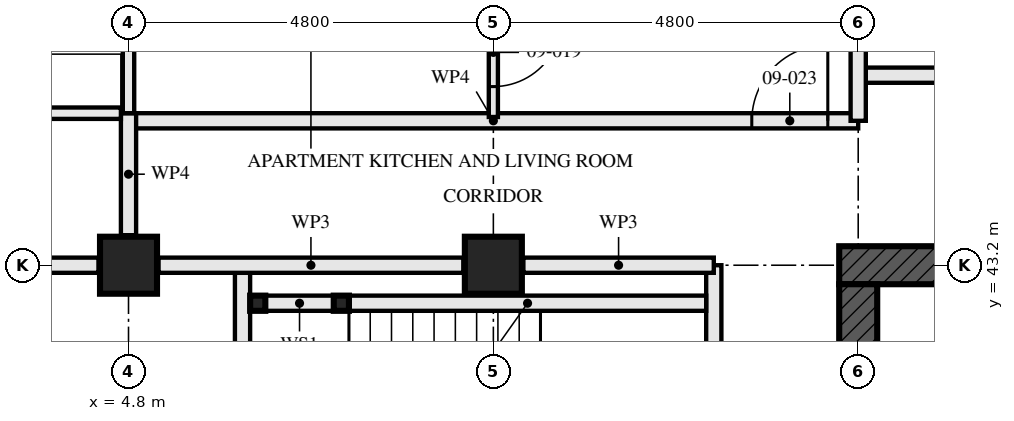
"""IFC4 building model, lengths in metres.
Left out: names, types, materials, properties, quantities, classifications, styles, units other than length and angle.
Written with IfcOpenShell. Run it as: python <this file> out.ifc"""

import sys

from ifc_helpers import new_model, si_unit, direction, frame, frame_2d, origin, origin_2d, place, context, subcontext, project, spatial, rectangle, hollow_rectangle, extrude, element, fill, save


model = new_model("IFC4")
c1 = context("Model", 3, precision=1e-05, world=origin(), true_north=direction((0.0, 1.0)))
c2 = subcontext(c1, "Body", "Model", "MODEL_VIEW")
j1 = project(units=[si_unit("LENGTHUNIT", "METRE"), si_unit("PLANEANGLEUNIT", "RADIAN")], contexts=[c1])
p1 = place(None, origin())
s1 = spatial("IfcSite", under=j1, at=p1, CompositionType="ELEMENT")
p2 = place(p1, origin())
s2 = spatial("IfcBuilding", under=s1, at=p2, CompositionType="ELEMENT")
p3 = place(p2, frame((0.0, 0.0, 37.5)))
s3 = spatial("IfcBuildingStorey", under=s2, at=p3, CompositionType="ELEMENT", Elevation=37.5)
for number, where, z_axis, x_axis in (
    (1, (4.8, 43.2, 0.0), (0.0, 0.0, 1.0), (0.0, 1.0, 0.0)),
    (2, (9.6, 43.2, 0.0), (0.0, 0.0, 1.0), (0.0, 1.0, 0.0)),
):
    element("IfcColumn", number, at=place(p3, frame(where, z_axis=z_axis, x_axis=x_axis)), inside=s3, PredefinedType="COLUMN", context=c2, shape_type="SweptSolid", body=[
        extrude(hollow_rectangle(XDim=0.75, YDim=0.75, WallThickness=0.08, at=origin_2d()), origin(), (0.0, 0.0, 1.0), 3.5),
    ])
p4 = place(p3, frame((29.05, 43.2, -0.17), z_axis=(0.0, 0.0, 1.0), x_axis=(-1.0, 0.0, 0.0)))
e3 = element("IfcWall", 3, at=p4, inside=s3, PredefinedType="SHEAR", context=c2, shape_type="SweptSolid", body=[
    extrude(rectangle(XDim=14.9, YDim=0.5, at=frame_2d((7.45, 0.0))), origin(), (0.0, 0.0, 1.0), 3.5),
])
p5 = place(p4, frame((6.85, 0.0, 0.17)))
e4 = element("IfcOpeningElement", 4, at=p5, cuts=e3, PredefinedType="OPENING", context=c2, shape_type="SweptSolid", body=[
    extrude(rectangle(XDim=1.2, YDim=2.1, at=frame_2d((0.6, 1.05))), frame((0.0, 0.26, 0.0), z_axis=(0.0, -1.0, 0.0), x_axis=(1.0, 0.0, 0.0)), (0.0, 0.0, 1.0), 0.521),
])
p6 = place(p3, frame((14.4, 42.95, -0.17), z_axis=(0.0, 0.0, 1.0), x_axis=(0.0, -1.0, 0.0)))
e5 = element("IfcWall", 5, at=p6, inside=s3, PredefinedType="SHEAR", context=c2, shape_type="SweptSolid", body=[
    extrude(rectangle(XDim=13.9, YDim=0.5, at=frame_2d((6.95, 0.0))), origin(), (0.0, 0.0, 1.0), 3.5),
])
p7 = place(p6, frame((6.35, 0.0, 0.17)))
e6 = element("IfcOpeningElement", 6, at=p7, cuts=e5, PredefinedType="OPENING", context=c2, shape_type="SweptSolid", body=[
    extrude(rectangle(XDim=1.2, YDim=2.1, at=frame_2d((0.6, 1.05))), frame((0.0, 0.26, 0.0), z_axis=(0.0, -1.0, 0.0), x_axis=(1.0, 0.0, 0.0)), (0.0, 0.0, 1.0), 0.521),
])
for number, where, z_axis, x_axis in (
    (7, (6.5, 42.7, 0.0), (0.0, 0.0, 1.0), (1.0, 0.0, 0.0)),
    (8, (7.6, 42.7, 0.0), (0.0, 0.0, 1.0), (1.0, 0.0, 0.0)),
):
    element("IfcColumn", number, at=place(p3, frame(where, z_axis=z_axis, x_axis=x_axis)), inside=s3, PredefinedType="COLUMN", context=c2, shape_type="SweptSolid", body=[
        extrude(hollow_rectangle(XDim=0.2, YDim=0.2, WallThickness=0.008, at=origin_2d()), origin(), (0.0, 0.0, 1.0), 3.33),
    ])
p8 = place(p3, frame((6.6, 42.7, 0.0), z_axis=(0.0, 0.0, 1.0), x_axis=(1.0, 0.0, 0.0)))
e9 = element("IfcWall", 9, at=p8, inside=s3, PredefinedType="SOLIDWALL", context=c2, shape_type="SweptSolid", body=[
    extrude(rectangle(XDim=0.9, YDim=0.2, at=frame_2d((0.45, 0.0))), origin(), (0.0, 0.0, 1.0), 2.99),
])
p9 = place(p3, frame((7.7, 42.7, 0.0), z_axis=(0.0, 0.0, 1.0), x_axis=(1.0, 0.0, 0.0)))
e10 = element("IfcWall", 10, at=p9, inside=s3, PredefinedType="SOLIDWALL", context=c2, shape_type="SweptSolid", body=[
    extrude(rectangle(XDim=4.7, YDim=0.2, at=frame_2d((2.35, 0.0))), origin(), (0.0, 0.0, 1.0), 2.99),
])
p10 = place(p3, frame((6.3, 43.1, 0.0), z_axis=(0.0, 0.0, 1.0), x_axis=(0.0, -1.0, 0.0)))
e11 = element("IfcWall", 11, at=p10, inside=s3, PredefinedType="SOLIDWALL", context=c2, shape_type="SweptSolid", body=[
    extrude(rectangle(XDim=3.3, YDim=0.2, at=frame_2d((1.65, 0.0))), origin(), (0.0, 0.0, 1.0), 3.33),
])
p11 = place(p3, frame((12.5, 43.2, 0.0), z_axis=(0.0, 0.0, 1.0), x_axis=(0.0, -1.0, 0.0)))
e12 = element("IfcWall", 12, at=p11, inside=s3, PredefinedType="PARTITIONING", context=c2, shape_type="SweptSolid", body=[
    extrude(rectangle(XDim=14.4, YDim=0.2, at=frame_2d((7.2, 0.0))), origin(), (0.0, 0.0, 1.0), 2.55),
])
p12 = place(p11, frame((1.4, 0.0, 0.0)))
e13 = element("IfcOpeningElement", 13, at=p12, cuts=e12, PredefinedType="OPENING", context=c2, shape_type="SweptSolid", body=[
    extrude(rectangle(XDim=1.0, YDim=2.1, at=frame_2d((0.5, 1.05))), frame((0.0, 0.111, 0.0), z_axis=(0.0, -1.0, 0.0), x_axis=(1.0, 0.0, 0.0)), (0.0, 0.0, 1.0), 0.221),
])
p13 = place(p11, frame((10.0, 0.0, 0.0)))
e14 = element("IfcOpeningElement", 14, at=p13, cuts=e12, PredefinedType="OPENING", context=c2, shape_type="SweptSolid", body=[
    extrude(rectangle(XDim=1.0, YDim=2.1, at=frame_2d((0.5, 1.05))), frame((0.0, 0.111, 0.0), z_axis=(0.0, -1.0, 0.0), x_axis=(1.0, 0.0, 0.0)), (0.0, 0.0, 1.0), 0.221),
])
p14 = place(p3, frame((4.8, 48.2, 0.0), z_axis=(0.0, 0.0, 1.0), x_axis=(0.0, -1.0, 0.0)))
e15 = element("IfcWall", 15, at=p14, inside=s3, PredefinedType="PARTITIONING", context=c2, shape_type="SweptSolid", body=[
    extrude(rectangle(XDim=3.0, YDim=0.15, at=frame_2d((1.5, 0.0))), origin(), (0.0, 0.0, 1.0), 2.55),
])
p15 = place(p14, frame((1.05, 0.0, 0.0)))
e16 = element("IfcOpeningElement", 16, at=p15, cuts=e15, PredefinedType="OPENING", context=c2, shape_type="SweptSolid", body=[
    extrude(rectangle(XDim=0.9, YDim=2.1, at=frame_2d((0.45, 1.05))), frame((0.0, 0.085, 0.0), z_axis=(0.0, -1.0, 0.0), x_axis=(1.0, 0.0, 0.0)), (0.0, 0.0, 1.0), 0.171),
])
p16 = place(p3, frame((9.6, 49.8, 0.0), z_axis=(0.0, 0.0, 1.0), x_axis=(0.0, -1.0, 0.0)))
e17 = element("IfcWall", 17, at=p16, inside=s3, PredefinedType="PARTITIONING", context=c2, shape_type="SweptSolid", body=[
    extrude(rectangle(XDim=4.65, YDim=0.12, at=frame_2d((2.325, 0.0))), origin(), (0.0, 0.0, 1.0), 2.55),
])
p17 = place(p16, frame((3.35, 0.0, 0.0)))
e18 = element("IfcOpeningElement", 18, at=p17, cuts=e17, PredefinedType="OPENING", context=c2, shape_type="SweptSolid", body=[
    extrude(rectangle(XDim=0.9, YDim=2.1, at=frame_2d((0.45, 1.05))), frame((0.0, 0.071, 0.0), z_axis=(0.0, -1.0, 0.0), x_axis=(1.0, 0.0, 0.0)), (0.0, 0.0, 1.0), 0.141),
])
p18 = place(p3, frame((14.4, 45.1, 0.0), z_axis=(0.0, 0.0, 1.0), x_axis=(-1.0, 0.0, 0.0)))
e19 = element("IfcWall", 19, at=p18, inside=s3, PredefinedType="PARTITIONING", context=c2, shape_type="SweptSolid", body=[
    extrude(rectangle(XDim=9.6, YDim=0.2, at=frame_2d((4.8, 0.0))), origin(), (0.0, 0.0, 1.0), 3.33),
])
p19 = place(p18, frame((0.4, 0.0, 0.0)))
e20 = element("IfcOpeningElement", 20, at=p19, cuts=e19, PredefinedType="OPENING", context=c2, shape_type="SweptSolid", body=[
    extrude(rectangle(XDim=1.0, YDim=2.1, at=frame_2d((0.5, 1.05))), frame((0.0, 0.111, 0.0), z_axis=(0.0, -1.0, 0.0), x_axis=(1.0, 0.0, 0.0)), (0.0, 0.0, 1.0), 0.221),
])
p20 = place(p3, frame((4.8, 45.2, 0.0), z_axis=(0.0, 0.0, 1.0), x_axis=(0.0, -1.0, 0.0)))
e21 = element("IfcWall", 21, at=p20, inside=s3, PredefinedType="PARTITIONING", context=c2, shape_type="SweptSolid", body=[
    extrude(rectangle(XDim=1.605, YDim=0.2, at=frame_2d((0.802, 0.0))), origin(), (0.0, 0.0, 1.0), 3.33),
])
p21 = place(p3, frame((28.8, 45.7, 0.0), z_axis=(0.0, 0.0, 1.0), x_axis=(-1.0, 0.0, 0.0)))
e22 = element("IfcWall", 22, at=p21, inside=s3, PredefinedType="PARTITIONING", context=c2, shape_type="SweptSolid", body=[
    extrude(rectangle(XDim=14.4, YDim=0.2, at=frame_2d((7.2, 0.0))), origin(), (0.0, 0.0, 1.0), 3.33),
])
p22 = place(p21, frame((0.4, 0.0, 0.0)))
e23 = element("IfcOpeningElement", 23, at=p22, cuts=e22, PredefinedType="OPENING", context=c2, shape_type="SweptSolid", body=[
    extrude(rectangle(XDim=1.0, YDim=2.1, at=frame_2d((0.5, 1.05))), frame((0.0, 0.111, 0.0), z_axis=(0.0, -1.0, 0.0), x_axis=(1.0, 0.0, 0.0)), (0.0, 0.0, 1.0), 0.221),
])
p23 = place(p3, frame((12.5, 43.2, 0.0), z_axis=(0.0, 0.0, 1.0), x_axis=(-1.0, 0.0, 0.0)))
e24 = element("IfcWall", 24, at=p23, inside=s3, PredefinedType="PARTITIONING", context=c2, shape_type="SweptSolid", body=[
    extrude(rectangle(XDim=2.505, YDim=0.2, at=frame_2d((1.252, 0.0))), origin(), (0.0, 0.0, 1.0), 2.32),
])
p24 = place(p3, frame((9.205, 43.2, 0.0), z_axis=(0.0, 0.0, 1.0), x_axis=(-1.0, 0.0, 0.0)))
e25 = element("IfcWall", 25, at=p24, inside=s3, PredefinedType="PARTITIONING", context=c2, shape_type="SweptSolid", body=[
    extrude(rectangle(XDim=4.01, YDim=0.2, at=frame_2d((2.005, 0.0))), origin(), (0.0, 0.0, 1.0), 2.32),
])
p25 = place(p3, frame((4.405, 43.2, 0.0), z_axis=(0.0, 0.0, 1.0), x_axis=(-1.0, 0.0, 0.0)))
e26 = element("IfcWall", 26, at=p25, inside=s3, PredefinedType="PARTITIONING", context=c2, shape_type="SweptSolid", body=[
    extrude(rectangle(XDim=4.085, YDim=0.2, at=frame_2d((2.042, 0.0))), origin(), (0.0, 0.0, 1.0), 2.32),
])
p26 = place(p3, frame((14.4, 45.1, 0.0), z_axis=(0.0, 0.0, 1.0), x_axis=(0.0, 1.0, 0.0)))
e27 = element("IfcWall", 27, at=p26, inside=s3, PredefinedType="PARTITIONING", context=c2, shape_type="SweptSolid", body=[
    extrude(rectangle(XDim=2.555, YDim=0.2, at=frame_2d((1.277, 0.0))), origin(), (0.0, 0.0, 1.0), 2.32),
])
p27 = place(p3, frame((4.7, 45.2, 0.0), z_axis=(0.0, 0.0, 1.0), x_axis=(-1.0, 0.0, 0.0)))
e28 = element("IfcWall", 28, at=p27, inside=s3, PredefinedType="PARTITIONING", context=c2, shape_type="SweptSolid", body=[
    extrude(rectangle(XDim=5.135, YDim=0.15, at=frame_2d((2.567, 0.0))), origin(), (0.0, 0.0, 1.0), 2.32),
])
p28 = place(p17, origin())
e29 = element("IfcDoor", 29, at=p28, inside=s3, OperationType="SINGLE_SWING_RIGHT", PredefinedType="DOOR", context=c2, shape_type="SweptSolid", body=[
    extrude(rectangle(XDim=0.9, YDim=2.1, at=frame_2d((0.45, 1.05))), frame((0.0, 0.022, 0.0), z_axis=(0.0, -1.0, 0.0), x_axis=(1.0, 0.0, 0.0)), (0.0, 0.0, 1.0), 0.044),
])
fill(e18, e29)
p29 = place(p19, frame((1.0, 0.0, 0.0), z_axis=(0.0, 0.0, 1.0), x_axis=(-1.0, 0.0, 0.0)))
e30 = element("IfcDoor", 30, at=p29, inside=s3, OperationType="SINGLE_SWING_LEFT", PredefinedType="DOOR", context=c2, shape_type="SweptSolid", body=[
    extrude(rectangle(XDim=1.0, YDim=2.1, at=frame_2d((0.5, 1.05))), frame((0.0, 0.027, 0.0), z_axis=(0.0, -1.0, 0.0), x_axis=(1.0, 0.0, 0.0)), (0.0, 0.0, 1.0), 0.054),
])
fill(e20, e30)
save(model, sys.argv[1])
